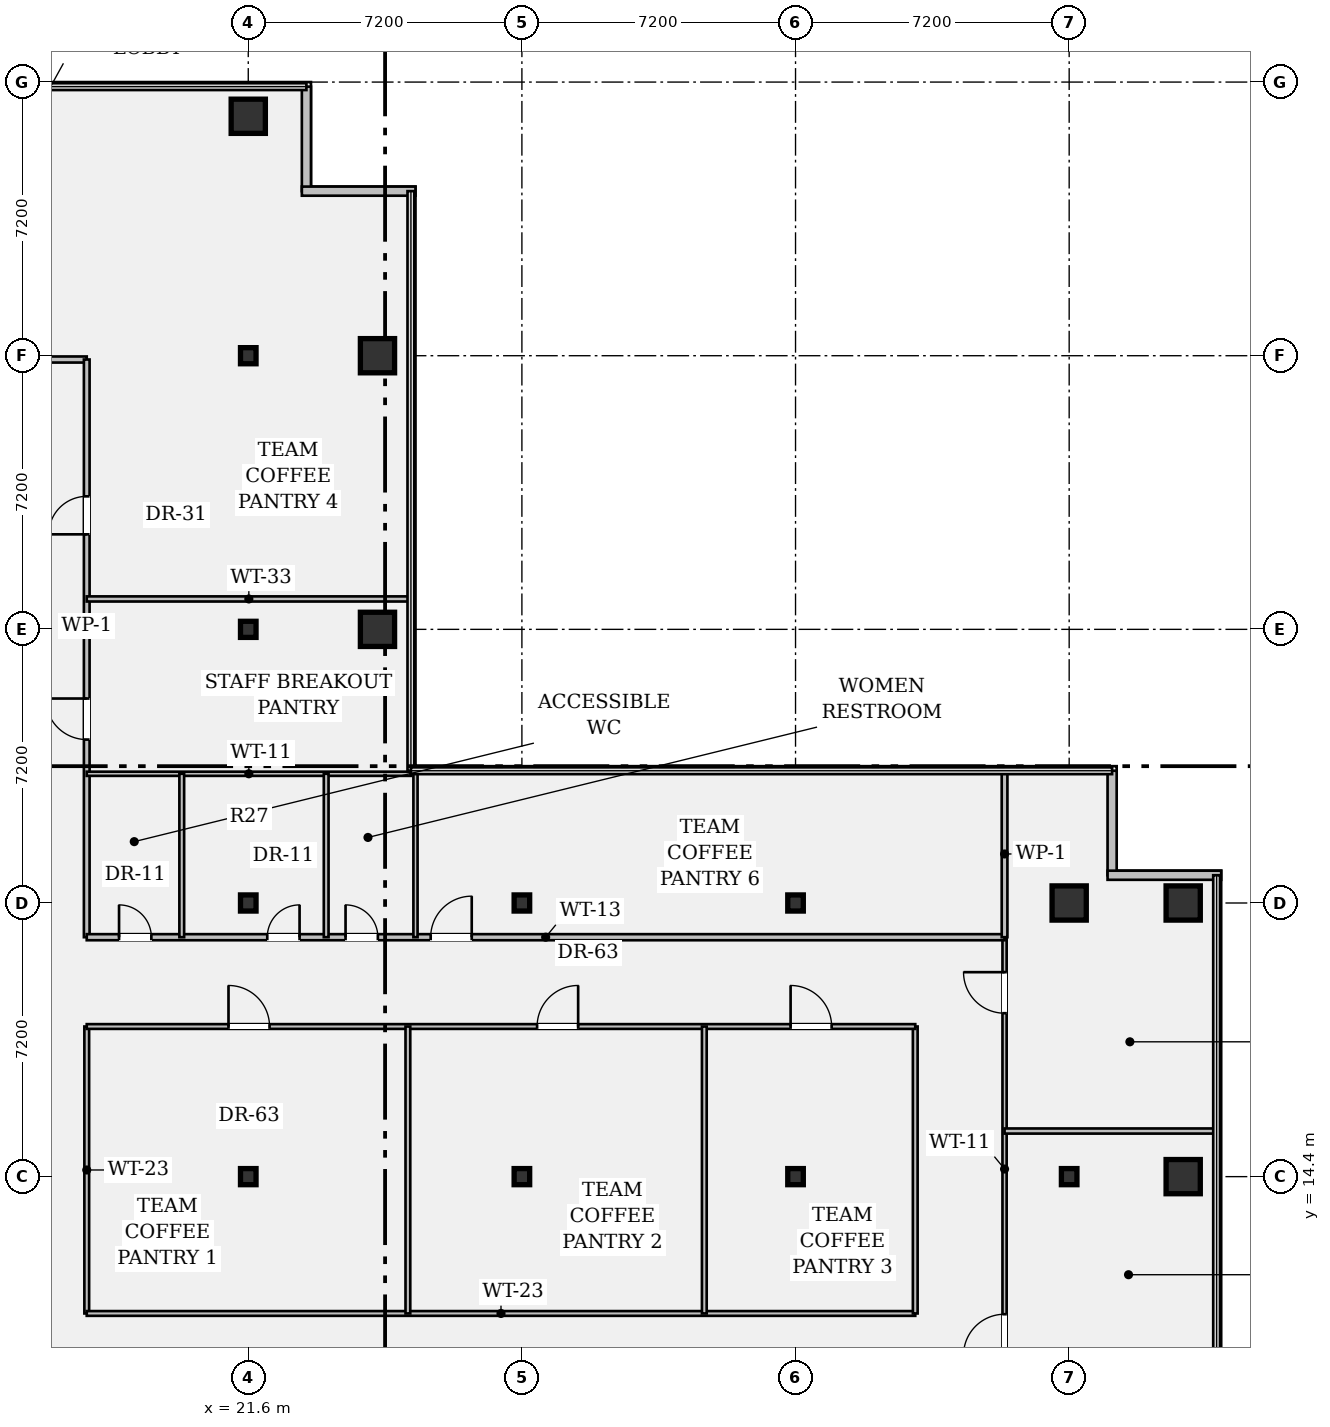
"""IFC4 building model, lengths in metres.
Left out: names, types, materials, properties, quantities, classifications, styles, units other than length and angle.
Written with IfcOpenShell. Run it as: python <this file> out.ifc"""

import sys

from ifc_helpers import new_model, si_unit, direction, frame, frame_2d, origin, origin_2d, place, context, subcontext, project, spatial, rectangle, hollow_rectangle, i_section, extrude, element, fill, save


model = new_model("IFC4")
c1 = context("Model", 3, precision=1e-05, world=origin(), true_north=direction((0.0, 1.0)))
c2 = subcontext(c1, "Body", "Model", "MODEL_VIEW")
j1 = project(units=[si_unit("LENGTHUNIT", "METRE"), si_unit("PLANEANGLEUNIT", "RADIAN")], contexts=[c1])
p1 = place(None, origin())
s1 = spatial("IfcSite", under=j1, at=p1, CompositionType="ELEMENT")
p2 = place(p1, origin())
s2 = spatial("IfcBuilding", under=s1, at=p2, CompositionType="ELEMENT")
p3 = place(p2, frame((0.0, 0.0, 117.6)))
s3 = spatial("IfcBuildingStorey", under=s2, at=p3, CompositionType="ELEMENT", Elevation=117.6)
for number, where, z_axis, x_axis in (
    (1, (21.6, 14.4, 0.0), (0.0, 0.0, 1.0), (1.0, 0.0, 0.0)),
    (2, (21.6, 21.6, 0.0), (0.0, 0.0, 1.0), (1.0, 0.0, 0.0)),
    (3, (21.6, 28.8, 0.0), (0.0, 0.0, 1.0), (1.0, 0.0, 0.0)),
    (4, (21.6, 36.0, 0.0), (0.0, 0.0, 1.0), (1.0, 0.0, 0.0)),
):
    element("IfcColumn", number, at=place(p3, frame(where, z_axis=z_axis, x_axis=x_axis)), inside=s3, PredefinedType="COLUMN", context=c2, shape_type="SweptSolid", body=[
        extrude(i_section(OverallWidth=0.409, OverallDepth=0.424, WebThickness=0.033, FlangeThickness=0.052, FilletRadius=0.018, at=origin_2d()), origin(), (0.0, 0.0, 1.0), 3.58),
    ])
for number, where, z_axis, x_axis in (
    (5, (21.6, 42.3, 0.0), (0.0, 0.0, 1.0), (1.0, 0.0, 0.0)),
    (6, (25.0, 28.8, 0.0), (0.0, 0.0, 1.0), (1.0, 0.0, 0.0)),
    (7, (25.0, 36.0, 0.0), (0.0, 0.0, 1.0), (1.0, 0.0, 0.0)),
):
    element("IfcColumn", number, at=place(p3, frame(where, z_axis=z_axis, x_axis=x_axis)), inside=s3, PredefinedType="COLUMN", context=c2, shape_type="SweptSolid", body=[
        extrude(hollow_rectangle(XDim=0.9, YDim=0.9, WallThickness=0.055, at=origin_2d()), origin(), (0.0, 0.0, 1.0), 3.58),
    ])
for number, where, z_axis, x_axis in (
    (8, (28.8, 14.4, 0.0), (0.0, 0.0, 1.0), (1.0, 0.0, 0.0)),
    (9, (28.8, 21.6, 0.0), (0.0, 0.0, 1.0), (1.0, 0.0, 0.0)),
    (10, (36.0, 14.4, 0.0), (0.0, 0.0, 1.0), (1.0, 0.0, 0.0)),
    (11, (36.0, 21.6, 0.0), (0.0, 0.0, 1.0), (1.0, 0.0, 0.0)),
    (12, (43.2, 14.4, 0.0), (0.0, 0.0, 1.0), (1.0, 0.0, 0.0)),
):
    element("IfcColumn", number, at=place(p3, frame(where, z_axis=z_axis, x_axis=x_axis)), inside=s3, PredefinedType="COLUMN", context=c2, shape_type="SweptSolid", body=[
        extrude(i_section(OverallWidth=0.409, OverallDepth=0.424, WebThickness=0.033, FlangeThickness=0.052, FilletRadius=0.018, at=origin_2d()), origin(), (0.0, 0.0, 1.0), 3.58),
    ])
for number, where, z_axis, x_axis in (
    (13, (43.2, 21.6, 0.0), (0.0, 0.0, 1.0), (1.0, 0.0, 0.0)),
    (14, (46.2, 14.4, 0.0), (0.0, 0.0, 1.0), (1.0, 0.0, 0.0)),
    (15, (46.2, 21.6, 0.0), (0.0, 0.0, 1.0), (1.0, 0.0, 0.0)),
):
    element("IfcColumn", number, at=place(p3, frame(where, z_axis=z_axis, x_axis=x_axis)), inside=s3, PredefinedType="COLUMN", context=c2, shape_type="SweptSolid", body=[
        extrude(hollow_rectangle(XDim=0.9, YDim=0.9, WallThickness=0.055, at=origin_2d()), origin(), (0.0, 0.0, 1.0), 3.58),
    ])
p4 = place(p3, frame((23.13, 43.08, 0.0), z_axis=(0.0, 0.0, 1.0), x_axis=(0.0, -1.0, 0.0)))
e16 = element("IfcWall", 16, at=p4, inside=s3, PredefinedType="STANDARD", context=c2, shape_type="SweptSolid", body=[
    extrude(rectangle(XDim=2.75, YDim=0.24, at=frame_2d((1.375, 0.0))), origin(), (0.0, 0.0, 1.0), 3.58),
])
p5 = place(p3, frame((23.01, 40.33, 0.0), z_axis=(0.0, 0.0, 1.0), x_axis=(1.0, 0.0, 0.0)))
e17 = element("IfcWall", 17, at=p5, inside=s3, PredefinedType="STANDARD", context=c2, shape_type="SweptSolid", body=[
    extrude(rectangle(XDim=2.99, YDim=0.24, at=frame_2d((1.495, 0.0))), origin(), (0.0, 0.0, 1.0), 3.58),
])
p6 = place(p3, frame((44.33, 25.08, 0.0), z_axis=(0.0, 0.0, 1.0), x_axis=(0.0, -1.0, 0.0)))
e18 = element("IfcWall", 18, at=p6, inside=s3, PredefinedType="STANDARD", context=c2, shape_type="SweptSolid", body=[
    extrude(rectangle(XDim=2.75, YDim=0.24, at=frame_2d((1.375, 0.0))), origin(), (0.0, 0.0, 1.0), 3.58),
])
p7 = place(p3, frame((44.21, 22.33, 0.0), z_axis=(0.0, 0.0, 1.0), x_axis=(1.0, 0.0, 0.0)))
e19 = element("IfcWall", 19, at=p7, inside=s3, PredefinedType="STANDARD", context=c2, shape_type="SweptSolid", body=[
    extrude(rectangle(XDim=2.99, YDim=0.24, at=frame_2d((1.495, 0.0))), origin(), (0.0, 0.0, 1.0), 3.58),
])
p8 = place(p3, frame((14.4, 35.9, 0.0), z_axis=(0.0, 0.0, 1.0), x_axis=(1.0, 0.0, 0.0)))
e20 = element("IfcWall", 20, at=p8, inside=s3, PredefinedType="PARTITIONING", context=c2, shape_type="SweptSolid", body=[
    extrude(rectangle(XDim=2.95, YDim=0.16, at=frame_2d((1.475, 0.0))), origin(), (0.0, 0.0, 1.0), 2.869),
])
p9 = place(p8, frame((0.95, 0.0, 0.0)))
e21 = element("IfcOpeningElement", 21, at=p9, cuts=e20, PredefinedType="OPENING", context=c2, shape_type="SweptSolid", body=[
    extrude(rectangle(XDim=1.0, YDim=2.15, at=frame_2d((0.5, 1.075))), frame((0.0, 0.092, 0.0), z_axis=(0.0, -1.0, 0.0), x_axis=(1.0, 0.0, 0.0)), (0.0, 0.0, 1.0), 0.184),
])
p10 = place(p3, frame((17.35, 20.7, 0.0), z_axis=(0.0, 0.0, 1.0), x_axis=(0.0, 1.0, 0.0)))
e22 = element("IfcWall", 22, at=p10, inside=s3, PredefinedType="PARTITIONING", context=c2, shape_type="SweptSolid", body=[
    extrude(rectangle(XDim=15.2, YDim=0.15, at=frame_2d((7.6, 0.0))), origin(), (0.0, 0.0, 1.0), 2.869),
])
p11 = place(p10, frame((5.2, 0.0, 0.0)))
e23 = element("IfcOpeningElement", 23, at=p11, cuts=e22, PredefinedType="OPENING", context=c2, shape_type="SweptSolid", body=[
    extrude(rectangle(XDim=1.08, YDim=2.15, at=frame_2d((0.54, 1.075))), frame((0.0, 0.087, 0.0), z_axis=(0.0, -1.0, 0.0), x_axis=(1.0, 0.0, 0.0)), (0.0, 0.0, 1.0), 0.174),
])
p12 = place(p10, frame((10.6, 0.0, 0.0)))
e24 = element("IfcOpeningElement", 24, at=p12, cuts=e22, PredefinedType="OPENING", context=c2, shape_type="SweptSolid", body=[
    extrude(rectangle(XDim=1.0, YDim=2.15, at=frame_2d((0.5, 1.075))), frame((0.0, 0.087, 0.0), z_axis=(0.0, -1.0, 0.0), x_axis=(1.0, 0.0, 0.0)), (0.0, 0.0, 1.0), 0.174),
])
p13 = place(p3, frame((41.5, 8.5, 0.0), z_axis=(0.0, 0.0, 1.0), x_axis=(0.0, 1.0, 0.0)))
e25 = element("IfcWall", 25, at=p13, inside=s3, PredefinedType="PARTITIONING", context=c2, shape_type="SweptSolid", body=[
    extrude(rectangle(XDim=12.2, YDim=0.11, at=frame_2d((6.1, 0.0))), origin(), (0.0, 0.0, 1.0), 2.869),
])
p14 = place(p13, frame((1.2, 0.0, 0.0)))
e26 = element("IfcOpeningElement", 26, at=p14, cuts=e25, PredefinedType="OPENING", context=c2, shape_type="SweptSolid", body=[
    extrude(rectangle(XDim=1.08, YDim=2.15, at=frame_2d((0.54, 1.075))), frame((0.0, 0.067, 0.0), z_axis=(0.0, -1.0, 0.0), x_axis=(1.0, 0.0, 0.0)), (0.0, 0.0, 1.0), 0.134),
])
p15 = place(p13, frame((10.2, 0.0, 0.0)))
e27 = element("IfcOpeningElement", 27, at=p15, cuts=e25, PredefinedType="OPENING", context=c2, shape_type="SweptSolid", body=[
    extrude(rectangle(XDim=1.08, YDim=2.15, at=frame_2d((0.54, 1.075))), frame((0.0, 0.067, 0.0), z_axis=(0.0, -1.0, 0.0), x_axis=(1.0, 0.0, 0.0)), (0.0, 0.0, 1.0), 0.134),
])
p16 = place(p3, frame((17.35, 20.7, 0.0), z_axis=(0.0, 0.0, 1.0), x_axis=(1.0, 0.0, 0.0)))
e28 = element("IfcWall", 28, at=p16, inside=s3, PredefinedType="PARTITIONING", context=c2, shape_type="SweptSolid", body=[
    extrude(rectangle(XDim=24.15, YDim=0.16, at=frame_2d((12.075, 0.0))), origin(), (0.0, 0.0, 1.0), 2.869),
])
p17 = place(p16, frame((0.85, 0.0, 0.0)))
e29 = element("IfcOpeningElement", 29, at=p17, cuts=e28, PredefinedType="OPENING", context=c2, shape_type="SweptSolid", body=[
    extrude(rectangle(XDim=0.85, YDim=2.15, at=frame_2d((0.425, 1.075))), frame((0.0, 0.092, 0.0), z_axis=(0.0, -1.0, 0.0), x_axis=(1.0, 0.0, 0.0)), (0.0, 0.0, 1.0), 0.184),
])
p18 = place(p16, frame((4.75, 0.0, 0.0)))
e30 = element("IfcOpeningElement", 30, at=p18, cuts=e28, PredefinedType="OPENING", context=c2, shape_type="SweptSolid", body=[
    extrude(rectangle(XDim=0.85, YDim=2.15, at=frame_2d((0.425, 1.075))), frame((0.0, 0.092, 0.0), z_axis=(0.0, -1.0, 0.0), x_axis=(1.0, 0.0, 0.0)), (0.0, 0.0, 1.0), 0.184),
])
p19 = place(p16, frame((6.81, 0.0, 0.0)))
e31 = element("IfcOpeningElement", 31, at=p19, cuts=e28, PredefinedType="OPENING", context=c2, shape_type="SweptSolid", body=[
    extrude(rectangle(XDim=0.85, YDim=2.15, at=frame_2d((0.425, 1.075))), frame((0.0, 0.092, 0.0), z_axis=(0.0, -1.0, 0.0), x_axis=(1.0, 0.0, 0.0)), (0.0, 0.0, 1.0), 0.184),
])
p20 = place(p16, frame((9.05, 0.0, 0.0)))
e32 = element("IfcOpeningElement", 32, at=p20, cuts=e28, PredefinedType="OPENING", context=c2, shape_type="SweptSolid", body=[
    extrude(rectangle(XDim=1.08, YDim=2.15, at=frame_2d((0.54, 1.075))), frame((0.0, 0.092, 0.0), z_axis=(0.0, -1.0, 0.0), x_axis=(1.0, 0.0, 0.0)), (0.0, 0.0, 1.0), 0.184),
])
p21 = place(p3, frame((17.35, 10.8, 0.0), z_axis=(0.0, 0.0, 1.0), x_axis=(0.0, 1.0, 0.0)))
e33 = element("IfcWall", 33, at=p21, inside=s3, PredefinedType="PARTITIONING", context=c2, shape_type="SweptSolid", body=[
    extrude(rectangle(XDim=7.55, YDim=0.125, at=frame_2d((3.775, 0.0))), origin(), (0.0, 0.0, 1.0), 2.869),
])
p22 = place(p3, frame((17.35, 10.8, 0.0), z_axis=(0.0, 0.0, 1.0), x_axis=(1.0, 0.0, 0.0)))
e34 = element("IfcWall", 34, at=p22, inside=s3, PredefinedType="PARTITIONING", context=c2, shape_type="SweptSolid", body=[
    extrude(rectangle(XDim=21.8, YDim=0.125, at=frame_2d((10.9, 0.0))), origin(), (0.0, 0.0, 1.0), 2.869),
])
p23 = place(p3, frame((39.15, 10.8, 0.0), z_axis=(0.0, 0.0, 1.0), x_axis=(0.0, 1.0, 0.0)))
e35 = element("IfcWall", 35, at=p23, inside=s3, PredefinedType="PARTITIONING", context=c2, shape_type="SweptSolid", body=[
    extrude(rectangle(XDim=7.55, YDim=0.125, at=frame_2d((3.775, 0.0))), origin(), (0.0, 0.0, 1.0), 2.869),
])
p24 = place(p3, frame((17.35, 18.35, 0.0), z_axis=(0.0, 0.0, 1.0), x_axis=(1.0, 0.0, 0.0)))
e36 = element("IfcWall", 36, at=p24, inside=s3, PredefinedType="PARTITIONING", context=c2, shape_type="SweptSolid", body=[
    extrude(rectangle(XDim=21.8, YDim=0.125, at=frame_2d((10.9, 0.0))), origin(), (0.0, 0.0, 1.0), 2.869),
])
p25 = place(p24, frame((3.73, 0.0, 0.0)))
e37 = element("IfcOpeningElement", 37, at=p25, cuts=e36, PredefinedType="OPENING", context=c2, shape_type="SweptSolid", body=[
    extrude(rectangle(XDim=1.08, YDim=2.15, at=frame_2d((0.54, 1.075))), frame((0.0, 0.074, 0.0), z_axis=(0.0, -1.0, 0.0), x_axis=(1.0, 0.0, 0.0)), (0.0, 0.0, 1.0), 0.149),
])
p26 = place(p24, frame((11.85, 0.0, 0.0)))
e38 = element("IfcOpeningElement", 38, at=p26, cuts=e36, PredefinedType="OPENING", context=c2, shape_type="SweptSolid", body=[
    extrude(rectangle(XDim=1.08, YDim=2.15, at=frame_2d((0.54, 1.075))), frame((0.0, 0.074, 0.0), z_axis=(0.0, -1.0, 0.0), x_axis=(1.0, 0.0, 0.0)), (0.0, 0.0, 1.0), 0.149),
])
p27 = place(p24, frame((18.52, 0.0, 0.0)))
e39 = element("IfcOpeningElement", 39, at=p27, cuts=e36, PredefinedType="OPENING", context=c2, shape_type="SweptSolid", body=[
    extrude(rectangle(XDim=1.08, YDim=2.15, at=frame_2d((0.54, 1.075))), frame((0.0, 0.074, 0.0), z_axis=(0.0, -1.0, 0.0), x_axis=(1.0, 0.0, 0.0)), (0.0, 0.0, 1.0), 0.149),
])
for number, where, z_axis, x_axis in (
    (40, (25.8, 10.8, 0.0), (0.0, 0.0, 1.0), (0.0, 1.0, 0.0)),
    (41, (33.6, 10.8, 0.0), (0.0, 0.0, 1.0), (0.0, 1.0, 0.0)),
):
    element("IfcWall", number, at=place(p3, frame(where, z_axis=z_axis, x_axis=x_axis)), inside=s3, PredefinedType="PARTITIONING", context=c2, shape_type="SweptSolid", body=[
        extrude(rectangle(XDim=7.55, YDim=0.125, at=frame_2d((3.775, 0.0))), origin(), (0.0, 0.0, 1.0), 2.869),
    ])
p28 = place(p3, frame((17.35, 25.0, 0.0), z_axis=(0.0, 0.0, 1.0), x_axis=(1.0, 0.0, 0.0)))
e42 = element("IfcWall", 42, at=p28, inside=s3, PredefinedType="PARTITIONING", context=c2, shape_type="SweptSolid", body=[
    extrude(rectangle(XDim=8.53, YDim=0.11, at=frame_2d((4.265, 0.0))), origin(), (0.0, 0.0, 1.0), 2.869),
])
for number, where, z_axis, x_axis in (
    (43, (19.85, 20.7, 0.0), (0.0, 0.0, 1.0), (0.0, 1.0, 0.0)),
    (44, (23.65, 20.7, 0.0), (0.0, 0.0, 1.0), (0.0, 1.0, 0.0)),
):
    element("IfcWall", number, at=place(p3, frame(where, z_axis=z_axis, x_axis=x_axis)), inside=s3, PredefinedType="PARTITIONING", context=c2, shape_type="SweptSolid", body=[
        extrude(rectangle(XDim=4.3, YDim=0.125, at=frame_2d((2.15, 0.0))), origin(), (0.0, 0.0, 1.0), 2.869),
    ])
p29 = place(p3, frame((17.35, 29.6, 0.0), z_axis=(0.0, 0.0, 1.0), x_axis=(1.0, 0.0, 0.0)))
e45 = element("IfcWall", 45, at=p29, inside=s3, PredefinedType="PARTITIONING", context=c2, shape_type="SweptSolid", body=[
    extrude(rectangle(XDim=8.53, YDim=0.135, at=frame_2d((4.265, 0.0))), origin(), (0.0, 0.0, 1.0), 2.869),
])
p30 = place(p3, frame((26.0, 20.7, 0.0), z_axis=(0.0, 0.0, 1.0), x_axis=(0.0, 1.0, 0.0)))
e46 = element("IfcWall", 46, at=p30, inside=s3, PredefinedType="PARTITIONING", context=c2, shape_type="SweptSolid", body=[
    extrude(rectangle(XDim=4.38, YDim=0.11, at=frame_2d((2.19, 0.0))), origin(), (0.0, 0.0, 1.0), 2.869),
])
p31 = place(p3, frame((41.5, 20.7, 0.0), z_axis=(0.0, 0.0, 1.0), x_axis=(0.0, 1.0, 0.0)))
e47 = element("IfcWall", 47, at=p31, inside=s3, PredefinedType="PARTITIONING", context=c2, shape_type="SweptSolid", body=[
    extrude(rectangle(XDim=4.38, YDim=0.15, at=frame_2d((2.19, 0.0))), origin(), (0.0, 0.0, 1.0), 2.869),
])
p32 = place(p3, frame((41.5, 15.6, 0.0), z_axis=(0.0, 0.0, 1.0), x_axis=(1.0, 0.0, 0.0)))
e48 = element("IfcWall", 48, at=p32, inside=s3, PredefinedType="PARTITIONING", context=c2, shape_type="SweptSolid", body=[
    extrude(rectangle(XDim=5.58, YDim=0.135, at=frame_2d((2.79, 0.0))), origin(), (0.0, 0.0, 1.0), 2.869),
])
p33 = place(p25, origin())
e49 = element("IfcDoor", 49, at=p33, inside=s3, OperationType="SINGLE_SWING_LEFT", PredefinedType="DOOR", context=c2, shape_type="SweptSolid", body=[
    extrude(rectangle(XDim=1.08, YDim=2.15, at=frame_2d((0.54, 1.075))), frame((0.0, 0.025, 0.0), z_axis=(0.0, -1.0, 0.0), x_axis=(1.0, 0.0, 0.0)), (0.0, 0.0, 1.0), 0.05),
])
fill(e37, e49)
p34 = place(p26, origin())
e50 = element("IfcDoor", 50, at=p34, inside=s3, OperationType="SINGLE_SWING_RIGHT", PredefinedType="DOOR", context=c2, shape_type="SweptSolid", body=[
    extrude(rectangle(XDim=1.08, YDim=2.15, at=frame_2d((0.54, 1.075))), frame((0.0, 0.025, 0.0), z_axis=(0.0, -1.0, 0.0), x_axis=(1.0, 0.0, 0.0)), (0.0, 0.0, 1.0), 0.05),
])
fill(e38, e50)
p35 = place(p27, origin())
e51 = element("IfcDoor", 51, at=p35, inside=s3, OperationType="SINGLE_SWING_LEFT", PredefinedType="DOOR", context=c2, shape_type="SweptSolid", body=[
    extrude(rectangle(XDim=1.08, YDim=2.15, at=frame_2d((0.54, 1.075))), frame((0.0, 0.025, 0.0), z_axis=(0.0, -1.0, 0.0), x_axis=(1.0, 0.0, 0.0)), (0.0, 0.0, 1.0), 0.05),
])
fill(e39, e51)
p36 = place(p17, origin())
e52 = element("IfcDoor", 52, at=p36, inside=s3, OperationType="SINGLE_SWING_LEFT", PredefinedType="DOOR", context=c2, shape_type="SweptSolid", body=[
    extrude(rectangle(XDim=0.85, YDim=2.15, at=frame_2d((0.425, 1.075))), frame((0.0, 0.025, 0.0), z_axis=(0.0, -1.0, 0.0), x_axis=(1.0, 0.0, 0.0)), (0.0, 0.0, 1.0), 0.05),
])
fill(e29, e52)
p37 = place(p18, origin())
e53 = element("IfcDoor", 53, at=p37, inside=s3, OperationType="SINGLE_SWING_RIGHT", PredefinedType="DOOR", context=c2, shape_type="SweptSolid", body=[
    extrude(rectangle(XDim=0.85, YDim=2.15, at=frame_2d((0.425, 1.075))), frame((0.0, 0.025, 0.0), z_axis=(0.0, -1.0, 0.0), x_axis=(1.0, 0.0, 0.0)), (0.0, 0.0, 1.0), 0.05),
])
fill(e30, e53)
p38 = place(p19, origin())
e54 = element("IfcDoor", 54, at=p38, inside=s3, OperationType="SINGLE_SWING_LEFT", PredefinedType="DOOR", context=c2, shape_type="SweptSolid", body=[
    extrude(rectangle(XDim=0.85, YDim=2.15, at=frame_2d((0.425, 1.075))), frame((0.0, 0.025, 0.0), z_axis=(0.0, -1.0, 0.0), x_axis=(1.0, 0.0, 0.0)), (0.0, 0.0, 1.0), 0.05),
])
fill(e31, e54)
p39 = place(p11, origin())
e55 = element("IfcDoor", 55, at=p39, inside=s3, OperationType="SINGLE_SWING_RIGHT", PredefinedType="DOOR", context=c2, shape_type="SweptSolid", body=[
    extrude(rectangle(XDim=1.08, YDim=2.15, at=frame_2d((0.54, 1.075))), frame((0.0, 0.025, 0.0), z_axis=(0.0, -1.0, 0.0), x_axis=(1.0, 0.0, 0.0)), (0.0, 0.0, 1.0), 0.05),
])
fill(e23, e55)
p40 = place(p12, origin())
e56 = element("IfcDoor", 56, at=p40, inside=s3, OperationType="SINGLE_SWING_LEFT", PredefinedType="DOOR", context=c2, shape_type="SweptSolid", body=[
    extrude(rectangle(XDim=1.0, YDim=2.15, at=frame_2d((0.5, 1.075))), frame((0.0, 0.025, 0.0), z_axis=(0.0, -1.0, 0.0), x_axis=(1.0, 0.0, 0.0)), (0.0, 0.0, 1.0), 0.05),
])
fill(e24, e56)
p41 = place(p20, origin())
e57 = element("IfcDoor", 57, at=p41, inside=s3, OperationType="SINGLE_SWING_RIGHT", PredefinedType="DOOR", context=c2, shape_type="SweptSolid", body=[
    extrude(rectangle(XDim=1.08, YDim=2.15, at=frame_2d((0.54, 1.075))), frame((0.0, 0.025, 0.0), z_axis=(0.0, -1.0, 0.0), x_axis=(1.0, 0.0, 0.0)), (0.0, 0.0, 1.0), 0.05),
])
fill(e32, e57)
p42 = place(p14, origin())
e58 = element("IfcDoor", 58, at=p42, inside=s3, OperationType="SINGLE_SWING_LEFT", PredefinedType="DOOR", context=c2, shape_type="SweptSolid", body=[
    extrude(rectangle(XDim=1.08, YDim=2.15, at=frame_2d((0.54, 1.075))), frame((0.0, 0.025, 0.0), z_axis=(0.0, -1.0, 0.0), x_axis=(1.0, 0.0, 0.0)), (0.0, 0.0, 1.0), 0.05),
])
fill(e26, e58)
p43 = place(p15, origin())
e59 = element("IfcDoor", 59, at=p43, inside=s3, OperationType="SINGLE_SWING_RIGHT", PredefinedType="DOOR", context=c2, shape_type="SweptSolid", body=[
    extrude(rectangle(XDim=1.08, YDim=2.15, at=frame_2d((0.54, 1.075))), frame((0.0, 0.025, 0.0), z_axis=(0.0, -1.0, 0.0), x_axis=(1.0, 0.0, 0.0)), (0.0, 0.0, 1.0), 0.05),
])
fill(e27, e59)
save(model, sys.argv[1])
